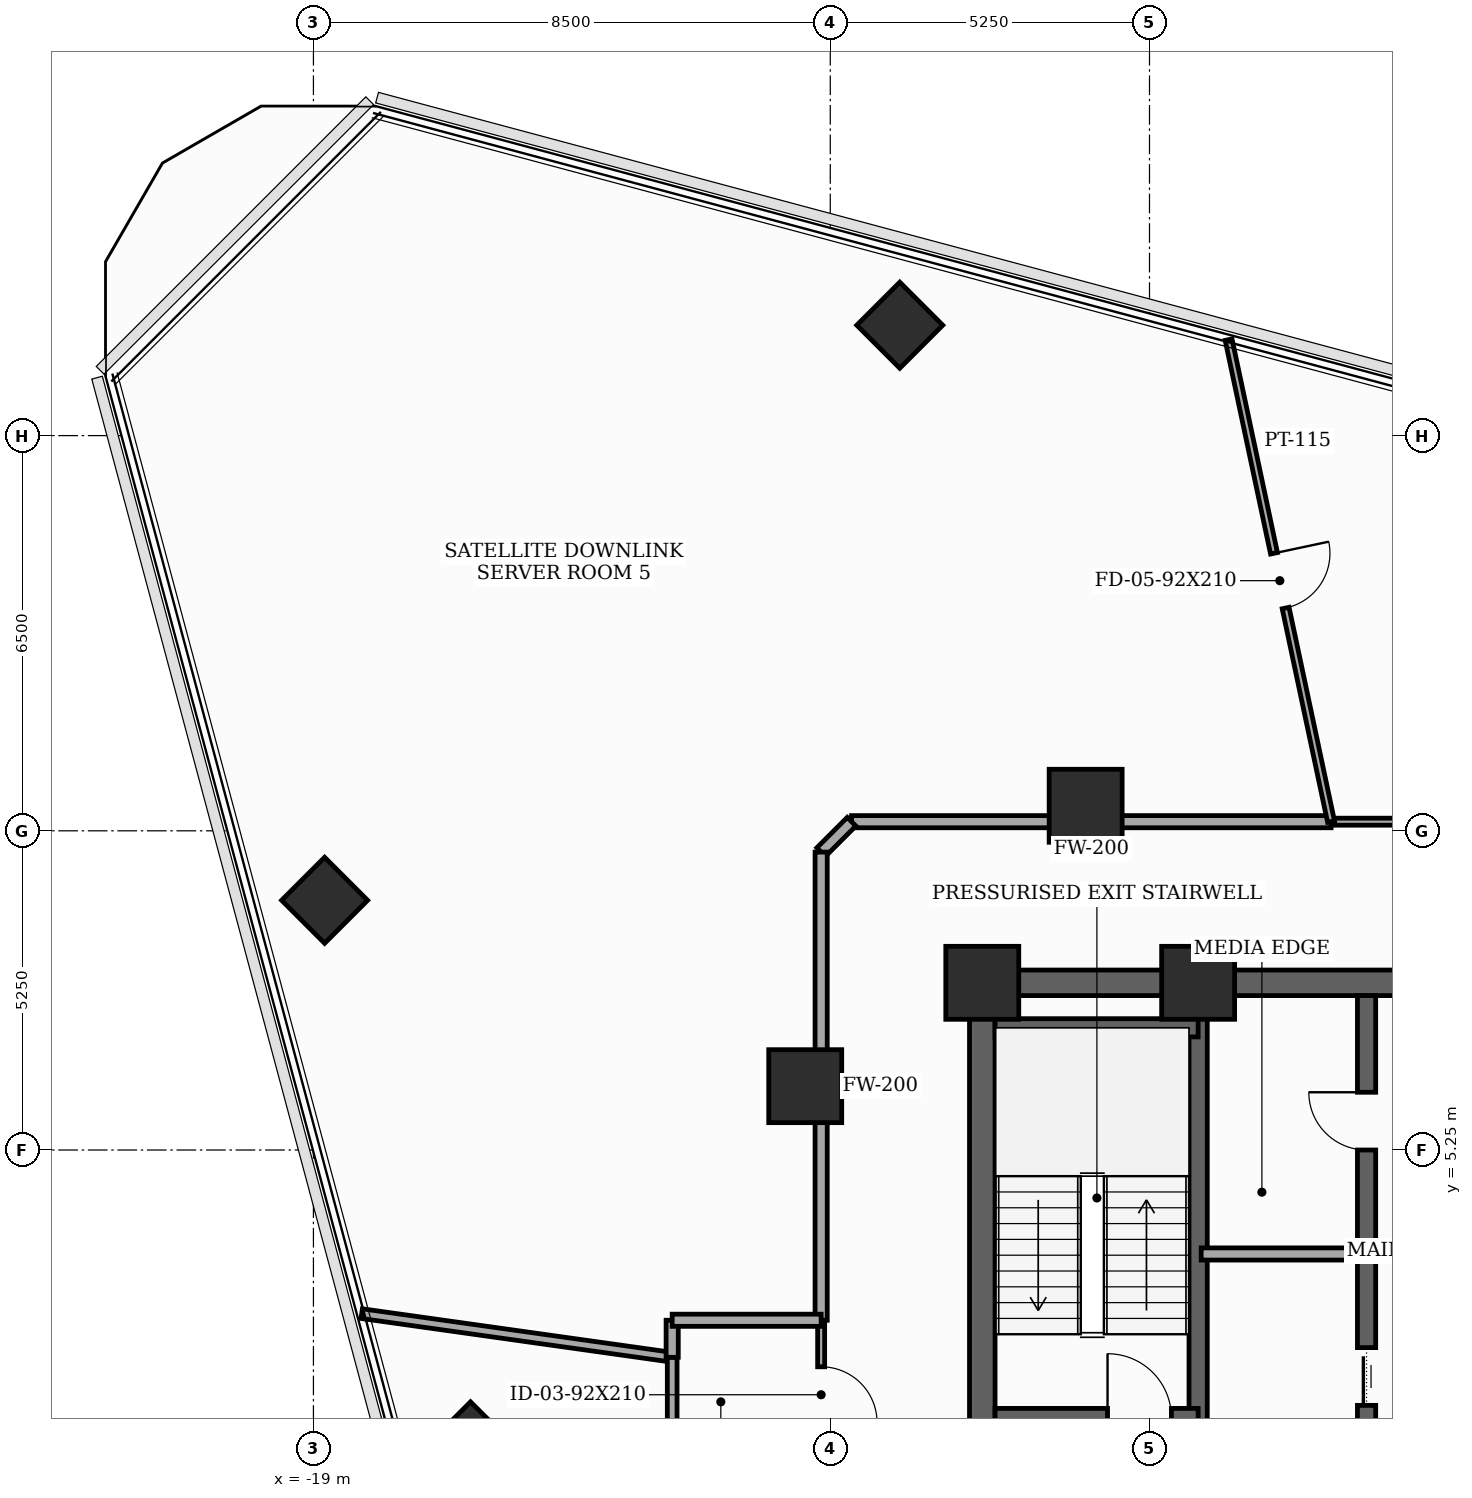
"""IFC4 building model, lengths in metres.
Left out: names, types, materials, properties, quantities, classifications, styles, units other than length and angle.
Written with IfcOpenShell. Run it as: python <this file> out.ifc"""

import sys

from ifc_helpers import new_model, si_unit, direction, frame, frame_2d, origin, origin_2d, place, context, subcontext, project, spatial, rectangle, extrude, element, fill, save


model = new_model("IFC4")
c1 = context("Model", 3, precision=1e-05, world=origin(), true_north=direction((0.0, 1.0)))
c2 = subcontext(c1, "Body", "Model", "MODEL_VIEW")
j1 = project(units=[si_unit("LENGTHUNIT", "METRE"), si_unit("PLANEANGLEUNIT", "RADIAN")], contexts=[c1])
p1 = place(None, origin())
s1 = spatial("IfcSite", under=j1, at=p1, CompositionType="ELEMENT")
p2 = place(p1, origin())
s2 = spatial("IfcBuilding", under=s1, at=p2, CompositionType="ELEMENT")
p3 = place(p2, frame((0.0, 0.0, 195.3)))
s3 = spatial("IfcBuildingStorey", under=s2, at=p3, CompositionType="ELEMENT", Elevation=195.3)
for number, where, z_axis, x_axis in (
    (1, (-4.45, 8.0, 0.0), (0.0, 0.0, 1.0), (1.0, 0.0, 0.0)),
    (2, (-8.0, 8.0, 0.0), (0.0, 0.0, 1.0), (1.0, 0.0, 0.0)),
    (3, (-6.3, 10.912, 0.0), (0.0, 0.0, 1.0), (1.0, 0.0, 0.0)),
    (4, (-10.912, 6.3, 0.0), (0.0, 0.0, 1.0), (1.0, 0.0, 0.0)),
):
    element("IfcColumn", number, at=place(p3, frame(where, z_axis=z_axis, x_axis=x_axis)), inside=s3, PredefinedType="COLUMN", context=c2, shape_type="SweptSolid", body=[
        extrude(rectangle(XDim=1.2, YDim=1.2, at=origin_2d()), origin(), (0.0, 0.0, 1.0), 3.7),
    ])
for number, where, z_axis, x_axis in (
    (5, (-9.357, 18.816, 0.0), (0.0, 0.0, 1.0), (0.707, 0.707, 0.0)),
    (6, (-18.816, 9.357, 0.0), (0.0, 0.0, 1.0), (0.707, 0.707, 0.0)),
    (7, (-16.416, 0.401, 0.0), (0.0, 0.0, 1.0), (0.707, 0.707, 0.0)),
):
    element("IfcColumn", number, at=place(p3, frame(where, z_axis=z_axis, x_axis=x_axis)), inside=s3, PredefinedType="COLUMN", context=c2, shape_type="SweptSolid", body=[
        extrude(rectangle(XDim=1.0, YDim=1.0, at=origin_2d()), origin(), (0.0, 0.0, 1.0), 3.7),
    ])
p4 = place(p3, frame((-8.0, -8.0, 0.0), z_axis=(0.0, 0.0, 1.0), x_axis=(0.0, 1.0, 0.0)))
e8 = element("IfcWall", 8, at=p4, inside=s3, PredefinedType="SHEAR", context=c2, shape_type="SweptSolid", body=[
    extrude(rectangle(XDim=16.0, YDim=0.42, at=frame_2d((8.0, 0.0))), origin(), (0.0, 0.0, 1.0), 3.5),
])
p5 = place(p4, frame((0.761, 0.0, 0.0)))
e9 = element("IfcOpeningElement", 9, at=p5, cuts=e8, PredefinedType="OPENING", context=c2, shape_type="SweptSolid", body=[
    extrude(rectangle(XDim=0.85, YDim=2.02, at=frame_2d((0.425, 1.01))), frame((0.0, 0.22, 0.0), z_axis=(0.0, -1.0, 0.0), x_axis=(1.0, 0.0, 0.0)), (0.0, 0.0, 1.0), 0.44),
])
p6 = place(p4, frame((5.35, 0.0, 0.0)))
e10 = element("IfcOpeningElement", 10, at=p6, cuts=e8, PredefinedType="OPENING", context=c2, shape_type="SweptSolid", body=[
    extrude(rectangle(XDim=1.05, YDim=2.15, at=frame_2d((0.525, 1.075))), frame((0.0, 0.22, 0.0), z_axis=(0.0, -1.0, 0.0), x_axis=(1.0, 0.0, 0.0)), (0.0, 0.0, 1.0), 0.44),
])
p7 = place(p3, frame((-8.0, 8.0, 0.0), z_axis=(0.0, 0.0, 1.0), x_axis=(1.0, 0.0, 0.0)))
e11 = element("IfcWall", 11, at=p7, inside=s3, PredefinedType="SHEAR", context=c2, shape_type="SweptSolid", body=[
    extrude(rectangle(XDim=16.0, YDim=0.42, at=frame_2d((8.0, 0.0))), origin(), (0.0, 0.0, 1.0), 3.5),
])
p8 = place(p7, frame((7.1, 0.0, 0.0)))
e12 = element("IfcOpeningElement", 12, at=p8, cuts=e11, PredefinedType="OPENING", context=c2, shape_type="SweptSolid", body=[
    extrude(rectangle(XDim=1.8, YDim=2.15, at=frame_2d((0.9, 1.075))), frame((0.0, 0.22, 0.0), z_axis=(0.0, -1.0, 0.0), x_axis=(1.0, 0.0, 0.0)), (0.0, 0.0, 1.0), 0.44),
])
p9 = place(p3, frame((-4.45, -7.79, 0.0), z_axis=(0.0, 0.0, 1.0), x_axis=(0.0, 1.0, 0.0)))
e13 = element("IfcWall", 13, at=p9, inside=s3, PredefinedType="SHEAR", context=c2, shape_type="SweptSolid", body=[
    extrude(rectangle(XDim=15.58, YDim=0.3, at=frame_2d((7.79, 0.0))), origin(), (0.0, 0.0, 1.0), 3.5),
])
p10 = place(p3, frame((-7.79, 0.85, 0.0), z_axis=(0.0, 0.0, 1.0), x_axis=(1.0, 0.0, 0.0)))
e14 = element("IfcWall", 14, at=p10, inside=s3, PredefinedType="SHEAR", context=c2, shape_type="SweptSolid", body=[
    extrude(rectangle(XDim=3.34, YDim=0.3, at=frame_2d((1.67, 0.0))), origin(), (0.0, 0.0, 1.0), 3.5),
])
p11 = place(p10, frame((1.85, 0.0, 0.0)))
e15 = element("IfcOpeningElement", 15, at=p11, cuts=e14, PredefinedType="OPENING", context=c2, shape_type="SweptSolid", body=[
    extrude(rectangle(XDim=1.05, YDim=2.15, at=frame_2d((0.525, 1.075))), frame((0.0, 0.16, 0.0), z_axis=(0.0, -1.0, 0.0), x_axis=(1.0, 0.0, 0.0)), (0.0, 0.0, 1.0), 0.32),
])
p12 = place(p3, frame((-7.79, 7.26, 0.0), z_axis=(0.0, 0.0, 1.0), x_axis=(1.0, 0.0, 0.0)))
e16 = element("IfcWall", 16, at=p12, inside=s3, PredefinedType="SHEAR", context=c2, shape_type="SweptSolid", body=[
    extrude(rectangle(XDim=3.34, YDim=0.3, at=frame_2d((1.67, 0.0))), origin(), (0.0, 0.0, 1.0), 3.5),
])
p13 = place(p3, frame((-1.68, -4.85, 0.0), z_axis=(0.0, 0.0, 1.0), x_axis=(0.0, 1.0, 0.0)))
e17 = element("IfcWall", 17, at=p13, inside=s3, PredefinedType="SHEAR", context=c2, shape_type="SweptSolid", body=[
    extrude(rectangle(XDim=12.64, YDim=0.3, at=frame_2d((6.32, 0.0))), origin(), (0.0, 0.0, 1.0), 3.5),
])
p14 = place(p13, frame((1.65, 0.0, 0.0)))
e18 = element("IfcOpeningElement", 18, at=p14, cuts=e17, PredefinedType="OPENING", context=c2, shape_type="SweptSolid", body=[
    extrude(rectangle(XDim=0.95, YDim=2.1, at=frame_2d((0.475, 1.05))), frame((0.0, 0.16, 0.0), z_axis=(0.0, -1.0, 0.0), x_axis=(1.0, 0.0, 0.0)), (0.0, 0.0, 1.0), 0.32),
])
p15 = place(p13, frame((5.9, 0.0, 0.0)))
e19 = element("IfcOpeningElement", 19, at=p15, cuts=e17, PredefinedType="OPENING", context=c2, shape_type="SweptSolid", body=[
    extrude(rectangle(XDim=0.95, YDim=2.1, at=frame_2d((0.475, 1.05))), frame((0.0, 0.16, 0.0), z_axis=(0.0, -1.0, 0.0), x_axis=(1.0, 0.0, 0.0)), (0.0, 0.0, 1.0), 0.32),
])
p16 = place(p13, frame((10.1, 0.0, 0.0)))
e20 = element("IfcOpeningElement", 20, at=p16, cuts=e17, PredefinedType="OPENING", context=c2, shape_type="SweptSolid", body=[
    extrude(rectangle(XDim=0.95, YDim=2.1, at=frame_2d((0.475, 1.05))), frame((0.0, 0.16, 0.0), z_axis=(0.0, -1.0, 0.0), x_axis=(1.0, 0.0, 0.0)), (0.0, 0.0, 1.0), 0.32),
])
p17 = place(p3, frame((-4.4, 3.54, 0.0), z_axis=(0.0, 0.0, 1.0), x_axis=(1.0, 0.0, 0.0)))
e21 = element("IfcWall", 21, at=p17, inside=s3, PredefinedType="SOLIDWALL", context=c2, shape_type="SweptSolid", body=[
    extrude(rectangle(XDim=2.68, YDim=0.2, at=frame_2d((1.34, 0.0))), origin(), (0.0, 0.0, 1.0), 3.5),
])
p18 = place(p3, frame((10.15, 10.65, 0.0), z_axis=(0.0, 0.0, 1.0), x_axis=(-1.0, 0.0, 0.0)))
e22 = element("IfcWall", 22, at=p18, inside=s3, PredefinedType="PARTITIONING", context=c2, shape_type="SweptSolid", body=[
    extrude(rectangle(XDim=12.414, YDim=0.115, at=frame_2d((6.207, 0.0))), origin(), (0.0, 0.0, 1.0), 2.885),
])
p19 = place(p18, frame((7.222, 0.0, 0.0)))
e23 = element("IfcOpeningElement", 23, at=p19, cuts=e22, PredefinedType="OPENING", context=c2, shape_type="SweptSolid", body=[
    extrude(rectangle(XDim=0.95, YDim=2.1, at=frame_2d((0.475, 1.05))), frame((0.0, 0.067, 0.0), z_axis=(0.0, -1.0, 0.0), x_axis=(1.0, 0.0, 0.0)), (0.0, 0.0, 1.0), 0.135),
])
p20 = place(p3, frame((-2.264, 10.65, 0.0), z_axis=(0.0, 0.0, 1.0), x_axis=(-1.0, 0.0, 0.0)))
e24 = element("IfcWall", 24, at=p20, inside=s3, PredefinedType="SOLIDWALL", context=c2, shape_type="SweptSolid", body=[
    extrude(rectangle(XDim=7.886, YDim=0.2, at=frame_2d((3.943, 0.0))), origin(), (0.0, 0.0, 1.0), 2.885),
])
p21 = place(p3, frame((-10.15, 10.65, 0.0), z_axis=(0.0, 0.0, 1.0), x_axis=(-0.707106781187, -0.707106781187, 0.0)))
e25 = element("IfcWall", 25, at=p21, inside=s3, PredefinedType="SOLIDWALL", context=c2, shape_type="SweptSolid", body=[
    extrude(rectangle(XDim=0.707, YDim=0.2, at=frame_2d((0.354, 0.0))), origin(), (0.0, 0.0, 1.0), 3.5),
])
p22 = place(p3, frame((-10.65, 10.15, 0.0), z_axis=(0.0, 0.0, 1.0), x_axis=(0.0, -1.0, 0.0)))
e26 = element("IfcWall", 26, at=p22, inside=s3, PredefinedType="SOLIDWALL", context=c2, shape_type="SweptSolid", body=[
    extrude(rectangle(XDim=7.7, YDim=0.2, at=frame_2d((3.85, 0.0))), origin(), (0.0, 0.0, 1.0), 2.885),
])
p23 = place(p3, frame((-10.65, 2.45, 0.0), z_axis=(0.0, 0.0, 1.0), x_axis=(0.0, -1.0, 0.0)))
e27 = element("IfcWall", 27, at=p23, inside=s3, PredefinedType="PARTITIONING", context=c2, shape_type="SweptSolid", body=[
    extrude(rectangle(XDim=2.45, YDim=0.115, at=frame_2d((1.225, 0.0))), origin(), (0.0, 0.0, 1.0), 2.885),
])
p24 = place(p23, frame((0.765, 0.0, 0.0)))
e28 = element("IfcOpeningElement", 28, at=p24, cuts=e27, PredefinedType="OPENING", context=c2, shape_type="SweptSolid", body=[
    extrude(rectangle(XDim=0.92, YDim=2.1, at=frame_2d((0.46, 1.05))), frame((0.0, 0.067, 0.0), z_axis=(0.0, -1.0, 0.0), x_axis=(1.0, 0.0, 0.0)), (0.0, 0.0, 1.0), 0.135),
])
p25 = place(p3, frame((-13.1, 1.841, 0.0), z_axis=(0.0, 0.0, 1.0), x_axis=(-0.990254946284, 0.139266440179, 0.0)))
e29 = element("IfcWall", 29, at=p25, inside=s3, PredefinedType="PARTITIONING", context=c2, shape_type="SweptSolid", body=[
    extrude(rectangle(XDim=5.156, YDim=0.16, at=frame_2d((2.578, 0.0))), origin(), (0.0, 0.0, 1.0), 2.985),
])
p26 = place(p3, frame((-13.1, 0.0, 0.0), z_axis=(0.0, 0.0, 1.0), x_axis=(0.0, 1.0, 0.0)))
e30 = element("IfcWall", 30, at=p26, inside=s3, PredefinedType="PARTITIONING", context=c2, shape_type="SweptSolid", body=[
    extrude(rectangle(XDim=1.841, YDim=0.16, at=frame_2d((0.92, 0.0))), origin(), (0.0, 0.0, 1.0), 2.985),
])
p27 = place(p3, frame((-3.949, 18.578, 0.0), z_axis=(0.0, 0.0, 1.0), x_axis=(0.20795313807, -0.978138789931, 0.0)))
e31 = element("IfcWall", 31, at=p27, inside=s3, PredefinedType="PARTITIONING", context=c2, shape_type="SweptSolid", body=[
    extrude(rectangle(XDim=8.105, YDim=0.115, at=frame_2d((4.053, 0.0))), origin(), (0.0, 0.0, 1.0), 2.885),
])
p28 = place(p27, frame((3.593, 0.0, 0.0)))
e32 = element("IfcOpeningElement", 32, at=p28, cuts=e31, PredefinedType="OPENING", context=c2, shape_type="SweptSolid", body=[
    extrude(rectangle(XDim=0.92, YDim=2.1, at=frame_2d((0.46, 1.05))), frame((0.0, 0.067, 0.0), z_axis=(0.0, -1.0, 0.0), x_axis=(1.0, 0.0, 0.0)), (0.0, 0.0, 1.0), 0.135),
])
p29 = place(p3, frame((-13.1, 1.841, 0.0), z_axis=(0.0, 0.0, 1.0), x_axis=(0.0, 1.0, 0.0)))
e33 = element("IfcWall", 33, at=p29, inside=s3, PredefinedType="SOLIDWALL", context=c2, shape_type="SweptSolid", body=[
    extrude(rectangle(XDim=0.609, YDim=0.2, at=frame_2d((0.304, 0.0))), origin(), (0.0, 0.0, 1.0), 3.5),
])
p30 = place(p3, frame((-13.1, 2.45, 0.0), z_axis=(0.0, 0.0, 1.0), x_axis=(1.0, 0.0, 0.0)))
e34 = element("IfcWall", 34, at=p30, inside=s3, PredefinedType="SOLIDWALL", context=c2, shape_type="SweptSolid", body=[
    extrude(rectangle(XDim=2.45, YDim=0.2, at=frame_2d((1.225, 0.0))), origin(), (0.0, 0.0, 1.0), 2.885),
])
p31 = place(p11, origin())
e35 = element("IfcDoor", 35, at=p31, inside=s3, OperationType="SINGLE_SWING_LEFT", PredefinedType="DOOR", context=c2, shape_type="SweptSolid", body=[
    extrude(rectangle(XDim=1.05, YDim=2.15, at=frame_2d((0.525, 1.075))), frame((0.0, 0.025, 0.0), z_axis=(0.0, -1.0, 0.0), x_axis=(1.0, 0.0, 0.0)), (0.0, 0.0, 1.0), 0.05),
])
fill(e15, e35)
p32 = place(p15, origin())
e36 = element("IfcDoor", 36, at=p32, inside=s3, OperationType="SLIDING_TO_LEFT", PredefinedType="DOOR", context=c2, shape_type="SweptSolid", body=[
    extrude(rectangle(XDim=0.95, YDim=2.1, at=frame_2d((0.475, 1.05))), frame((0.0, 0.025, 0.0), z_axis=(0.0, -1.0, 0.0), x_axis=(1.0, 0.0, 0.0)), (0.0, 0.0, 1.0), 0.05),
])
fill(e19, e36)
p33 = place(p16, origin())
e37 = element("IfcDoor", 37, at=p33, inside=s3, OperationType="SINGLE_SWING_RIGHT", PredefinedType="DOOR", context=c2, shape_type="SweptSolid", body=[
    extrude(rectangle(XDim=0.95, YDim=2.1, at=frame_2d((0.475, 1.05))), frame((0.0, 0.025, 0.0), z_axis=(0.0, -1.0, 0.0), x_axis=(1.0, 0.0, 0.0)), (0.0, 0.0, 1.0), 0.05),
])
fill(e20, e37)
p34 = place(p24, origin())
e38 = element("IfcDoor", 38, at=p34, inside=s3, OperationType="SINGLE_SWING_RIGHT", PredefinedType="DOOR", context=c2, shape_type="SweptSolid", body=[
    extrude(rectangle(XDim=0.92, YDim=2.1, at=frame_2d((0.46, 1.05))), frame((0.0, 0.025, 0.0), z_axis=(0.0, -1.0, 0.0), x_axis=(1.0, 0.0, 0.0)), (0.0, 0.0, 1.0), 0.05),
])
fill(e28, e38)
p35 = place(p28, origin())
e39 = element("IfcDoor", 39, at=p35, inside=s3, OperationType="SINGLE_SWING_LEFT", PredefinedType="DOOR", context=c2, shape_type="SweptSolid", body=[
    extrude(rectangle(XDim=0.92, YDim=2.1, at=frame_2d((0.46, 1.05))), frame((0.0, 0.025, 0.0), z_axis=(0.0, -1.0, 0.0), x_axis=(1.0, 0.0, 0.0)), (0.0, 0.0, 1.0), 0.05),
])
fill(e32, e39)
save(model, sys.argv[1])
